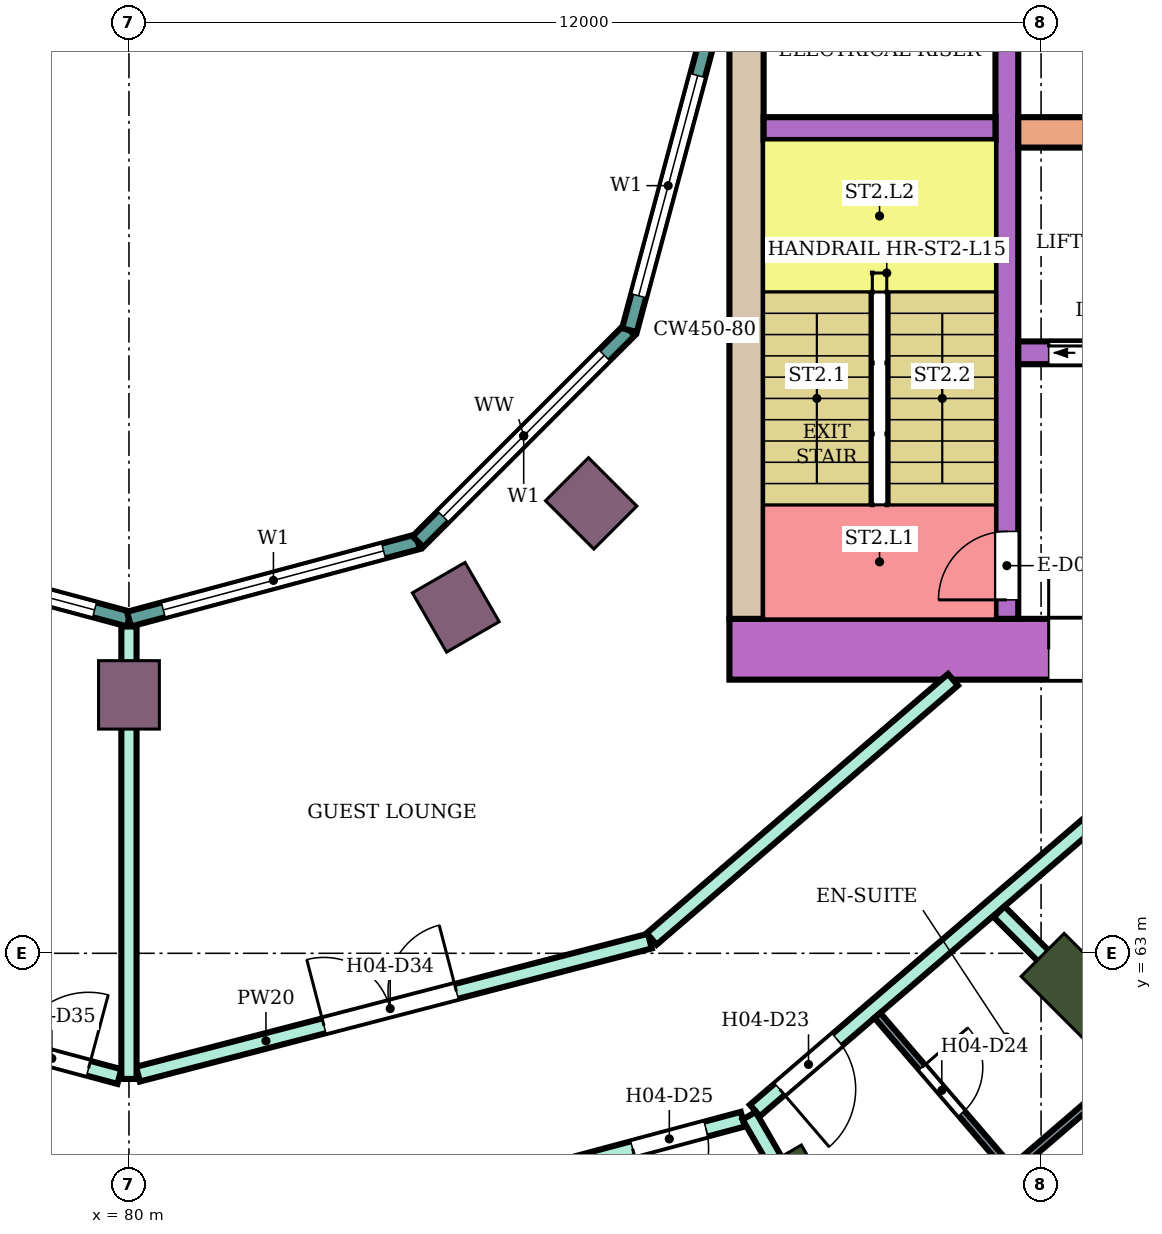
"""IFC4 building model, lengths in metres.
Left out: names, types, materials, properties, quantities, classifications, styles, units other than length and angle.
Written with IfcOpenShell. Run it as: python <this file> out.ifc"""

import sys

from ifc_helpers import new_model, si_unit, direction, frame, frame_2d, origin, origin_2d, place, context, subcontext, project, spatial, rectangle, extrude, element, fill, save


model = new_model("IFC4")
c1 = context("Model", 3, precision=1e-05, world=origin(), true_north=direction((0.0, 1.0)))
c2 = subcontext(c1, "Body", "Model", "MODEL_VIEW")
j1 = project(units=[si_unit("LENGTHUNIT", "METRE"), si_unit("PLANEANGLEUNIT", "RADIAN")], contexts=[c1])
p1 = place(None, origin())
s1 = spatial("IfcSite", under=j1, at=p1, CompositionType="ELEMENT")
p2 = place(p1, origin())
s2 = spatial("IfcBuilding", under=s1, at=p2, CompositionType="ELEMENT")
p3 = place(p2, frame((0.0, 0.0, 66.8)))
s3 = spatial("IfcBuildingStorey", under=s2, at=p3, CompositionType="ELEMENT", Elevation=66.8)
for number, where, z_axis, x_axis in (
    (1, (88.8, 59.758, 0.0), (0.0, 0.0, 1.0), (0.5, -0.866, 0.0)),
    (2, (92.445, 62.555, 0.0), (0.0, 0.0, 1.0), (0.707, -0.707, 0.0)),
):
    element("IfcColumn", number, at=place(p3, frame(where, z_axis=z_axis, x_axis=x_axis)), inside=s3, PredefinedType="COLUMN", context=c2, shape_type="SweptSolid", body=[
        extrude(rectangle(XDim=1.2, YDim=0.8, at=origin_2d()), origin(), (0.0, 0.0, 1.0), 3.8),
    ])
for number, where, z_axis, x_axis in (
    (3, (80.0, 66.4, 0.0), (0.0, 0.0, 1.0), (0.0, -1.0, 0.0)),
    (4, (84.3, 67.552, 0.0), (0.0, 0.0, 1.0), (0.5, -0.866, 0.0)),
    (5, (86.081, 68.919, 0.0), (0.0, 0.0, 1.0), (0.707, -0.707, 0.0)),
):
    element("IfcColumn", number, at=place(p3, frame(where, z_axis=z_axis, x_axis=x_axis)), inside=s3, PredefinedType="COLUMN", context=c2, shape_type="SweptSolid", body=[
        extrude(rectangle(XDim=0.9, YDim=0.8, at=origin_2d()), origin(), (0.0, 0.0, 1.0), 3.8),
    ])
p4 = place(p3, frame((87.9, 67.0, 0.0), z_axis=(0.0, 0.0, 1.0), x_axis=(1.0, 0.0, 0.0)))
e6 = element("IfcWall", 6, at=p4, inside=s3, PredefinedType="SHEAR", context=c2, shape_type="SweptSolid", body=[
    extrude(rectangle(XDim=14.7, YDim=0.8, at=frame_2d((7.35, 0.0))), origin(), (0.0, 0.0, 1.0), 3.48),
])
p5 = place(p4, frame((4.2, 0.0, 0.0)))
e7 = element("IfcOpeningElement", 7, at=p5, cuts=e6, PredefinedType="OPENING", context=c2, shape_type="SweptSolid", body=[
    extrude(rectangle(XDim=2.4, YDim=2.4, at=frame_2d((1.2, 1.2))), frame((0.0, 0.41, 0.0), z_axis=(0.0, -1.0, 0.0), x_axis=(1.0, 0.0, 0.0)), (0.0, 0.0, 1.0), 0.82),
])
p6 = place(p3, frame((88.125, 67.4, 0.0), z_axis=(0.0, 0.0, 1.0), x_axis=(0.0, 1.0, 0.0)))
e8 = element("IfcWall", 8, at=p6, inside=s3, PredefinedType="SHEAR", context=c2, shape_type="SweptSolid", body=[
    extrude(rectangle(XDim=7.6, YDim=0.45, at=frame_2d((3.8, 0.0))), origin(), (0.0, 0.0, 1.0), 3.48),
])
p7 = place(p3, frame((91.55, 67.4, 0.0), z_axis=(0.0, 0.0, 1.0), x_axis=(0.0, 1.0, 0.0)))
e9 = element("IfcWall", 9, at=p7, inside=s3, PredefinedType="SHEAR", context=c2, shape_type="SweptSolid", body=[
    extrude(rectangle(XDim=7.6, YDim=0.3, at=frame_2d((3.8, 0.0))), origin(), (0.0, 0.0, 1.0), 3.48),
])
p8 = place(p7, frame((0.25, 0.0, 0.0)))
e10 = element("IfcOpeningElement", 10, at=p8, cuts=e9, PredefinedType="OPENING", context=c2, shape_type="SweptSolid", body=[
    extrude(rectangle(XDim=0.9, YDim=2.1, at=frame_2d((0.45, 1.05))), frame((0.0, 0.16, 0.0), z_axis=(0.0, -1.0, 0.0), x_axis=(1.0, 0.0, 0.0)), (0.0, 0.0, 1.0), 0.32),
])
p9 = place(p3, frame((88.35, 73.85, 0.0), z_axis=(0.0, 0.0, 1.0), x_axis=(1.0, 0.0, 0.0)))
e11 = element("IfcWall", 11, at=p9, inside=s3, PredefinedType="SHEAR", context=c2, shape_type="SweptSolid", body=[
    extrude(rectangle(XDim=3.05, YDim=0.3, at=frame_2d((1.525, 0.0))), origin(), (0.0, 0.0, 1.0), 3.48),
])
p10 = place(p3, frame((91.7, 73.8, 0.0), z_axis=(0.0, 0.0, 1.0), x_axis=(1.0, 0.0, 0.0)))
e12 = element("IfcWall", 12, at=p10, inside=s3, PredefinedType="SHEAR", context=c2, shape_type="SweptSolid", body=[
    extrude(rectangle(XDim=10.9, YDim=0.4, at=frame_2d((5.45, 0.0))), origin(), (0.0, 0.0, 1.0), 3.48),
])
p11 = place(p3, frame((91.7, 70.9, 0.0), z_axis=(0.0, 0.0, 1.0), x_axis=(1.0, 0.0, 0.0)))
e13 = element("IfcWall", 13, at=p11, inside=s3, PredefinedType="SHEAR", context=c2, shape_type="SweptSolid", body=[
    extrude(rectangle(XDim=10.9, YDim=0.3, at=frame_2d((5.45, 0.0))), origin(), (0.0, 0.0, 1.0), 3.48),
])
p12 = place(p11, frame((0.4, 0.0, 0.0)))
e14 = element("IfcOpeningElement", 14, at=p12, cuts=e13, PredefinedType="OPENING", context=c2, shape_type="SweptSolid", body=[
    extrude(rectangle(XDim=1.4, YDim=2.1, at=frame_2d((0.7, 1.05))), frame((0.0, 0.16, 0.0), z_axis=(0.0, -1.0, 0.0), x_axis=(1.0, 0.0, 0.0)), (0.0, 0.0, 1.0), 0.32),
])
p13 = place(p11, frame((5.4, 0.0, 0.0)))
e15 = element("IfcOpeningElement", 15, at=p13, cuts=e13, PredefinedType="OPENING", context=c2, shape_type="SweptSolid", body=[
    extrude(rectangle(XDim=1.4, YDim=2.1, at=frame_2d((0.7, 1.05))), frame((0.0, 0.16, 0.0), z_axis=(0.0, -1.0, 0.0), x_axis=(1.0, 0.0, 0.0)), (0.0, 0.0, 1.0), 0.32),
])
p14 = place(p11, frame((8.1, 0.0, 0.0)))
e16 = element("IfcOpeningElement", 16, at=p14, cuts=e13, PredefinedType="OPENING", context=c2, shape_type="SweptSolid", body=[
    extrude(rectangle(XDim=1.0, YDim=2.1, at=frame_2d((0.5, 1.05))), frame((0.0, 0.16, 0.0), z_axis=(0.0, -1.0, 0.0), x_axis=(1.0, 0.0, 0.0)), (0.0, 0.0, 1.0), 0.32),
])
p15 = place(p3, frame((76.198, 68.415, 0.0), z_axis=(0.0, 0.0, 1.0), x_axis=(0.965933654434, -0.258789828301, 0.0)))
e17 = element("IfcWall", 17, at=p15, inside=s3, PredefinedType="NOTDEFINED", context=c2, shape_type="SweptSolid", body=[
    extrude(rectangle(XDim=3.936, YDim=0.2, at=frame_2d((1.968, 0.0))), origin(), (0.0, 0.0, 1.0), 3.8),
])
p16 = place(p15, frame((0.468, 0.0, 0.9)))
e18 = element("IfcOpeningElement", 18, at=p16, cuts=e17, PredefinedType="OPENING", context=c2, shape_type="SweptSolid", body=[
    extrude(rectangle(XDim=3.0, YDim=2.3, at=frame_2d((1.5, 1.15))), frame((0.0, 0.11, 0.0), z_axis=(0.0, -1.0, 0.0), x_axis=(1.0, 0.0, 0.0)), (0.0, 0.0, 1.0), 0.22),
])
p17 = place(p3, frame((80.0, 67.396, 0.0), z_axis=(0.0, 0.0, 1.0), x_axis=(0.965933654434, 0.258789828301, 0.0)))
e19 = element("IfcWall", 19, at=p17, inside=s3, PredefinedType="NOTDEFINED", context=c2, shape_type="SweptSolid", body=[
    extrude(rectangle(XDim=3.936, YDim=0.2, at=frame_2d((1.968, 0.0))), origin(), (0.0, 0.0, 1.0), 3.8),
])
p18 = place(p17, frame((0.468, 0.0, 0.9)))
e20 = element("IfcOpeningElement", 20, at=p18, cuts=e19, PredefinedType="OPENING", context=c2, shape_type="SweptSolid", body=[
    extrude(rectangle(XDim=3.0, YDim=2.3, at=frame_2d((1.5, 1.15))), frame((0.0, 0.11, 0.0), z_axis=(0.0, -1.0, 0.0), x_axis=(1.0, 0.0, 0.0)), (0.0, 0.0, 1.0), 0.22),
])
p19 = place(p3, frame((83.802, 68.415, 0.0), z_axis=(0.0, 0.0, 1.0), x_axis=(0.707106781187, 0.707106781187, 0.0)))
e21 = element("IfcWall", 21, at=p19, inside=s3, PredefinedType="NOTDEFINED", context=c2, shape_type="SweptSolid", body=[
    extrude(rectangle(XDim=3.936, YDim=0.2, at=frame_2d((1.968, 0.0))), origin(), (0.0, 0.0, 1.0), 3.8),
])
p20 = place(p19, frame((0.468, 0.0, 0.9)))
e22 = element("IfcOpeningElement", 22, at=p20, cuts=e21, PredefinedType="OPENING", context=c2, shape_type="SweptSolid", body=[
    extrude(rectangle(XDim=3.0, YDim=2.3, at=frame_2d((1.5, 1.15))), frame((0.0, 0.11, 0.0), z_axis=(0.0, -1.0, 0.0), x_axis=(1.0, 0.0, 0.0)), (0.0, 0.0, 1.0), 0.22),
])
p21 = place(p3, frame((86.585, 71.198, 0.0), z_axis=(0.0, 0.0, 1.0), x_axis=(0.258789828301, 0.965933654434, 0.0)))
e23 = element("IfcWall", 23, at=p21, inside=s3, PredefinedType="NOTDEFINED", context=c2, shape_type="SweptSolid", body=[
    extrude(rectangle(XDim=3.936, YDim=0.2, at=frame_2d((1.968, 0.0))), origin(), (0.0, 0.0, 1.0), 3.8),
])
p22 = place(p21, frame((0.468, 0.0, 0.9)))
e24 = element("IfcOpeningElement", 24, at=p22, cuts=e23, PredefinedType="OPENING", context=c2, shape_type="SweptSolid", body=[
    extrude(rectangle(XDim=3.0, YDim=2.3, at=frame_2d((1.5, 1.15))), frame((0.0, 0.11, 0.0), z_axis=(0.0, -1.0, 0.0), x_axis=(1.0, 0.0, 0.0)), (0.0, 0.0, 1.0), 0.22),
])
p23 = place(p3, frame((71.877, 60.832, 0.0), z_axis=(0.0, 0.0, 1.0), x_axis=(0.965852509869, -0.259092510851, 0.0)))
e25 = element("IfcWall", 25, at=p23, inside=s3, PredefinedType="PARTITIONING", context=c2, shape_type="SweptSolid", body=[
    extrude(rectangle(XDim=8.32, YDim=0.2, at=frame_2d((4.16, 0.0))), origin(), (0.0, 0.0, 1.0), 3.35),
])
p24 = place(p23, frame((6.86, 0.0, 0.0)))
e26 = element("IfcOpeningElement", 26, at=p24, cuts=e25, PredefinedType="OPENING", context=c2, shape_type="SweptSolid", body=[
    extrude(rectangle(XDim=1.0, YDim=2.1, at=frame_2d((0.5, 1.05))), frame((0.0, 0.11, 0.0), z_axis=(0.0, -1.0, 0.0), x_axis=(1.0, 0.0, 0.0)), (0.0, 0.0, 1.0), 0.22),
])
p25 = place(p23, frame((0.55, 0.0, 0.0)))
e27 = element("IfcOpeningElement", 27, at=p25, cuts=e25, PredefinedType="OPENING", context=c2, shape_type="SweptSolid", body=[
    extrude(rectangle(XDim=1.0, YDim=2.1, at=frame_2d((0.5, 1.05))), frame((0.0, 0.11, 0.0), z_axis=(0.0, -1.0, 0.0), x_axis=(1.0, 0.0, 0.0)), (0.0, 0.0, 1.0), 0.22),
])
p26 = place(p3, frame((73.297, 63.143, 0.0), z_axis=(0.0, 0.0, 1.0), x_axis=(0.965859030528, -0.25906820173, 0.0)))
e28 = element("IfcWall", 28, at=p26, inside=s3, PredefinedType="PARTITIONING", context=c2, shape_type="SweptSolid", body=[
    extrude(rectangle(XDim=6.81, YDim=0.2, at=frame_2d((3.405, 0.0))), origin(), (0.0, 0.0, 1.0), 3.35),
])
p27 = place(p26, frame((5.39, 0.0, 0.0)))
e29 = element("IfcOpeningElement", 29, at=p27, cuts=e28, PredefinedType="OPENING", context=c2, shape_type="SweptSolid", body=[
    extrude(rectangle(XDim=1.0, YDim=2.1, at=frame_2d((0.5, 1.05))), frame((0.0, 0.11, 0.0), z_axis=(0.0, -1.0, 0.0), x_axis=(1.0, 0.0, 0.0)), (0.0, 0.0, 1.0), 0.22),
])
p28 = place(p3, frame((80.119, 61.41, 0.0), z_axis=(0.0, 0.0, 1.0), x_axis=(0.967823361235, 0.251630565408, 0.0)))
e30 = element("IfcWall", 30, at=p28, inside=s3, PredefinedType="PARTITIONING", context=c2, shape_type="SweptSolid", body=[
    extrude(rectangle(XDim=6.958, YDim=0.2, at=frame_2d((3.479, 0.0))), origin(), (0.0, 0.0, 1.0), 3.35),
])
p29 = place(p28, frame((2.529, 0.0, 0.0)))
e31 = element("IfcOpeningElement", 31, at=p29, cuts=e30, PredefinedType="OPENING", context=c2, shape_type="SweptSolid", body=[
    extrude(rectangle(XDim=1.8, YDim=2.1, at=frame_2d((0.9, 1.05))), frame((0.0, 0.11, 0.0), z_axis=(0.0, -1.0, 0.0), x_axis=(1.0, 0.0, 0.0)), (0.0, 0.0, 1.0), 0.22),
])
p30 = place(p3, frame((80.0, 58.655, 0.0), z_axis=(0.0, 0.0, 1.0), x_axis=(0.965974635626, 0.258636817424, 0.0)))
e32 = element("IfcWall", 32, at=p30, inside=s3, PredefinedType="PARTITIONING", context=c2, shape_type="SweptSolid", body=[
    extrude(rectangle(XDim=8.36, YDim=0.2, at=frame_2d((4.18, 0.0))), origin(), (0.0, 0.0, 1.0), 3.35),
])
p31 = place(p30, frame((6.86, 0.0, 0.0)))
e33 = element("IfcOpeningElement", 33, at=p31, cuts=e32, PredefinedType="OPENING", context=c2, shape_type="SweptSolid", body=[
    extrude(rectangle(XDim=1.0, YDim=2.1, at=frame_2d((0.5, 1.05))), frame((0.0, 0.11, 0.0), z_axis=(0.0, -1.0, 0.0), x_axis=(1.0, 0.0, 0.0)), (0.0, 0.0, 1.0), 0.22),
])
p32 = place(p30, frame((0.55, 0.0, 0.0)))
e34 = element("IfcOpeningElement", 34, at=p32, cuts=e32, PredefinedType="OPENING", context=c2, shape_type="SweptSolid", body=[
    extrude(rectangle(XDim=1.0, YDim=2.1, at=frame_2d((0.5, 1.05))), frame((0.0, 0.11, 0.0), z_axis=(0.0, -1.0, 0.0), x_axis=(1.0, 0.0, 0.0)), (0.0, 0.0, 1.0), 0.22),
])
p33 = place(p3, frame((80.0, 61.347, 0.0), z_axis=(0.0, 0.0, 1.0), x_axis=(0.0, 1.0, 0.0)))
e35 = element("IfcWall", 35, at=p33, inside=s3, PredefinedType="PARTITIONING", context=c2, shape_type="SweptSolid", body=[
    extrude(rectangle(XDim=5.953, YDim=0.2, at=frame_2d((2.977, 0.0))), origin(), (0.0, 0.0, 1.0), 3.35),
])
p34 = place(p3, frame((86.877, 63.189, 0.0), z_axis=(0.0, 0.0, 1.0), x_axis=(0.758088707506, 0.652151448325, 0.0)))
e36 = element("IfcWall", 36, at=p34, inside=s3, PredefinedType="PARTITIONING", context=c2, shape_type="SweptSolid", body=[
    extrude(rectangle(XDim=5.229, YDim=0.2, at=frame_2d((2.615, 0.0))), origin(), (0.0, 0.0, 1.0), 3.35),
])
p35 = place(p3, frame((88.235, 60.931, 0.0), z_axis=(0.0, 0.0, 1.0), x_axis=(0.758799498714, 0.651324282329, 0.0)))
e37 = element("IfcWall", 37, at=p35, inside=s3, PredefinedType="PARTITIONING", context=c2, shape_type="SweptSolid", body=[
    extrude(rectangle(XDim=6.186, YDim=0.2, at=frame_2d((3.093, 0.0))), origin(), (0.0, 0.0, 1.0), 3.35),
])
p36 = place(p35, frame((0.43, 0.0, 0.0)))
e38 = element("IfcOpeningElement", 38, at=p36, cuts=e37, PredefinedType="OPENING", context=c2, shape_type="SweptSolid", body=[
    extrude(rectangle(XDim=1.0, YDim=2.1, at=frame_2d((0.5, 1.05))), frame((0.0, 0.11, 0.0), z_axis=(0.0, -1.0, 0.0), x_axis=(1.0, 0.0, 0.0)), (0.0, 0.0, 1.0), 0.22),
])
p37 = place(p3, frame((88.159, 60.863, 0.0), z_axis=(0.0, 0.0, 1.0), x_axis=(0.499935840196, -0.866062443296, 0.0)))
e39 = element("IfcWall", 39, at=p37, inside=s3, PredefinedType="PARTITIONING", context=c2, shape_type="SweptSolid", body=[
    extrude(rectangle(XDim=9.475, YDim=0.2, at=frame_2d((4.737, 0.0))), origin(), (0.0, 0.0, 1.0), 3.35),
])
p38 = place(p3, frame((91.448, 63.547, 0.0), z_axis=(0.0, 0.0, 1.0), x_axis=(0.706984810649, -0.707228730688, 0.0)))
e40 = element("IfcWall", 40, at=p38, inside=s3, PredefinedType="PARTITIONING", context=c2, shape_type="SweptSolid", body=[
    extrude(rectangle(XDim=7.006, YDim=0.2, at=frame_2d((3.503, 0.0))), origin(), (0.0, 0.0, 1.0), 3.35),
])
p39 = place(p3, frame((89.846, 62.182, 0.0), z_axis=(0.0, 0.0, 1.0), x_axis=(0.652095405055, -0.758136915541, 0.0)))
e41 = element("IfcWall", 41, at=p39, inside=s3, PredefinedType="PARTITIONING", context=c2, shape_type="SweptSolid", body=[
    extrude(rectangle(XDim=2.65, YDim=0.1, at=frame_2d((1.325, 0.0))), origin(), (0.0, 0.0, 1.0), 3.35),
])
p40 = place(p39, frame((0.9, 0.0, 0.0)))
e42 = element("IfcOpeningElement", 42, at=p40, cuts=e41, PredefinedType="OPENING", context=c2, shape_type="SweptSolid", body=[
    extrude(rectangle(XDim=0.8, YDim=2.1, at=frame_2d((0.4, 1.05))), frame((0.0, 0.06, 0.0), z_axis=(0.0, -1.0, 0.0), x_axis=(1.0, 0.0, 0.0)), (0.0, 0.0, 1.0), 0.12),
])
p41 = place(p3, frame((91.607, 60.135, 0.0), z_axis=(0.0, 0.0, 1.0), x_axis=(0.758121792225, 0.65211298726, 0.0)))
e43 = element("IfcWall", 43, at=p41, inside=s3, PredefinedType="PARTITIONING", context=c2, shape_type="SweptSolid", body=[
    extrude(rectangle(XDim=4.15, YDim=0.1, at=frame_2d((2.075, 0.0))), origin(), (0.0, 0.0, 1.0), 3.35),
])
p42 = place(p16, origin())
e44 = element("IfcWindow", 44, at=p42, inside=s3, PartitioningType="SINGLE_PANEL", PredefinedType="WINDOW", context=c2, shape_type="SweptSolid", body=[
    extrude(rectangle(XDim=3.0, YDim=2.3, at=frame_2d((1.5, 1.15))), frame((0.0, 0.03, 0.0), z_axis=(0.0, -1.0, 0.0), x_axis=(1.0, 0.0, 0.0)), (0.0, 0.0, 1.0), 0.06),
])
fill(e18, e44)
p43 = place(p18, origin())
e45 = element("IfcWindow", 45, at=p43, inside=s3, PartitioningType="SINGLE_PANEL", PredefinedType="WINDOW", context=c2, shape_type="SweptSolid", body=[
    extrude(rectangle(XDim=3.0, YDim=2.3, at=frame_2d((1.5, 1.15))), frame((0.0, 0.03, 0.0), z_axis=(0.0, -1.0, 0.0), x_axis=(1.0, 0.0, 0.0)), (0.0, 0.0, 1.0), 0.06),
])
fill(e20, e45)
p44 = place(p20, origin())
e46 = element("IfcWindow", 46, at=p44, inside=s3, PartitioningType="SINGLE_PANEL", PredefinedType="WINDOW", context=c2, shape_type="SweptSolid", body=[
    extrude(rectangle(XDim=3.0, YDim=2.3, at=frame_2d((1.5, 1.15))), frame((0.0, 0.03, 0.0), z_axis=(0.0, -1.0, 0.0), x_axis=(1.0, 0.0, 0.0)), (0.0, 0.0, 1.0), 0.06),
])
fill(e22, e46)
p45 = place(p22, origin())
e47 = element("IfcWindow", 47, at=p45, inside=s3, PartitioningType="SINGLE_PANEL", PredefinedType="WINDOW", context=c2, shape_type="SweptSolid", body=[
    extrude(rectangle(XDim=3.0, YDim=2.3, at=frame_2d((1.5, 1.15))), frame((0.0, 0.03, 0.0), z_axis=(0.0, -1.0, 0.0), x_axis=(1.0, 0.0, 0.0)), (0.0, 0.0, 1.0), 0.06),
])
fill(e24, e47)
p46 = place(p36, frame((1.0, 0.0, 0.0), z_axis=(0.0, 0.0, 1.0), x_axis=(-1.0, 0.0, 0.0)))
e48 = element("IfcDoor", 48, at=p46, inside=s3, OperationType="SINGLE_SWING_RIGHT", PredefinedType="DOOR", context=c2, shape_type="SweptSolid", body=[
    extrude(rectangle(XDim=1.0, YDim=2.1, at=frame_2d((0.5, 1.05))), frame((0.0, 0.025, 0.0), z_axis=(0.0, -1.0, 0.0), x_axis=(1.0, 0.0, 0.0)), (0.0, 0.0, 1.0), 0.05),
])
fill(e38, e48)
p47 = place(p40, origin())
e49 = element("IfcDoor", 49, at=p47, inside=s3, OperationType="SINGLE_SWING_LEFT", PredefinedType="DOOR", context=c2, shape_type="SweptSolid", body=[
    extrude(rectangle(XDim=0.8, YDim=2.1, at=frame_2d((0.4, 1.05))), frame((0.0, 0.025, 0.0), z_axis=(0.0, -1.0, 0.0), x_axis=(1.0, 0.0, 0.0)), (0.0, 0.0, 1.0), 0.05),
])
fill(e42, e49)
p48 = place(p31, frame((1.0, 0.0, 0.0), z_axis=(0.0, 0.0, 1.0), x_axis=(-1.0, 0.0, 0.0)))
e50 = element("IfcDoor", 50, at=p48, inside=s3, OperationType="SINGLE_SWING_RIGHT", PredefinedType="DOOR", context=c2, shape_type="SweptSolid", body=[
    extrude(rectangle(XDim=1.0, YDim=2.1, at=frame_2d((0.5, 1.05))), frame((0.0, 0.025, 0.0), z_axis=(0.0, -1.0, 0.0), x_axis=(1.0, 0.0, 0.0)), (0.0, 0.0, 1.0), 0.05),
])
fill(e33, e50)
p49 = place(p29, origin())
e51 = element("IfcDoor", 51, at=p49, inside=s3, OperationType="DOUBLE_DOOR_SINGLE_SWING", PredefinedType="DOOR", context=c2, shape_type="SweptSolid", body=[
    extrude(rectangle(XDim=1.8, YDim=2.1, at=frame_2d((0.9, 1.05))), frame((0.0, 0.025, 0.0), z_axis=(0.0, -1.0, 0.0), x_axis=(1.0, 0.0, 0.0)), (0.0, 0.0, 1.0), 0.05),
])
fill(e31, e51)
p50 = place(p27, origin())
e52 = element("IfcDoor", 52, at=p50, inside=s3, OperationType="SINGLE_SWING_RIGHT", PredefinedType="DOOR", context=c2, shape_type="SweptSolid", body=[
    extrude(rectangle(XDim=1.0, YDim=2.1, at=frame_2d((0.5, 1.05))), frame((0.0, 0.025, 0.0), z_axis=(0.0, -1.0, 0.0), x_axis=(1.0, 0.0, 0.0)), (0.0, 0.0, 1.0), 0.05),
])
fill(e29, e52)
p51 = place(p8, origin())
e53 = element("IfcDoor", 53, at=p51, inside=s3, OperationType="SINGLE_SWING_LEFT", PredefinedType="DOOR", context=c2, shape_type="SweptSolid", body=[
    extrude(rectangle(XDim=0.9, YDim=2.1, at=frame_2d((0.45, 1.05))), frame((0.0, 0.025, 0.0), z_axis=(0.0, -1.0, 0.0), x_axis=(1.0, 0.0, 0.0)), (0.0, 0.0, 1.0), 0.05),
])
fill(e10, e53)
p52 = place(p12, origin())
e54 = element("IfcDoor", 54, at=p52, inside=s3, OperationType="DOUBLE_DOOR_SLIDING", PredefinedType="DOOR", context=c2, shape_type="SweptSolid", body=[
    extrude(rectangle(XDim=1.4, YDim=2.1, at=frame_2d((0.7, 1.05))), frame((0.0, 0.025, 0.0), z_axis=(0.0, -1.0, 0.0), x_axis=(1.0, 0.0, 0.0)), (0.0, 0.0, 1.0), 0.05),
])
fill(e14, e54)
p53 = place(p5, origin())
e55 = element("IfcDoor", 55, at=p53, inside=s3, OperationType="DOUBLE_DOOR_SINGLE_SWING", PredefinedType="DOOR", context=c2, shape_type="SweptSolid", body=[
    extrude(rectangle(XDim=2.4, YDim=2.4, at=frame_2d((1.2, 1.2))), frame((0.0, 0.025, 0.0), z_axis=(0.0, -1.0, 0.0), x_axis=(1.0, 0.0, 0.0)), (0.0, 0.0, 1.0), 0.05),
])
fill(e7, e55)
save(model, sys.argv[1])
